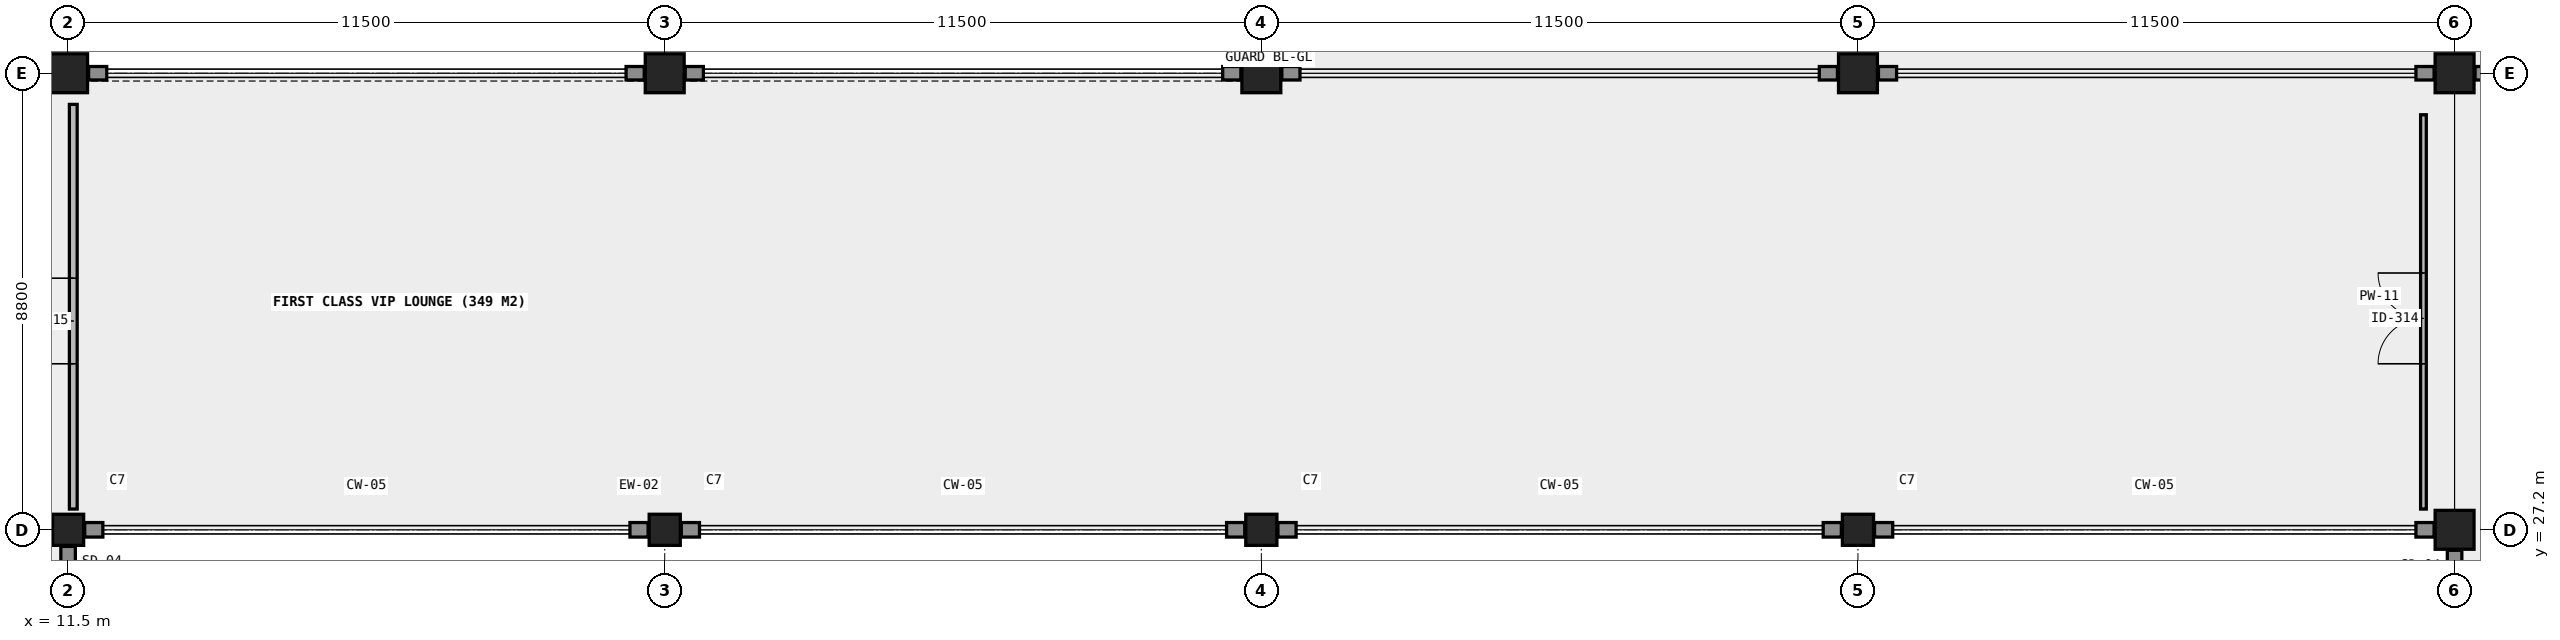
"""IFC4 building model, lengths in metres.
Left out: names, types, materials, properties, quantities, classifications, styles, units other than length and angle.
Written with IfcOpenShell. Run it as: python <this file> out.ifc"""

import sys

from ifc_helpers import new_model, si_unit, direction, frame, frame_2d, origin, origin_2d, place, context, subcontext, project, spatial, rectangle, circle, extrude, element, fill, save


model = new_model("IFC4")
c1 = context("Model", 3, precision=1e-05, world=origin(), true_north=direction((0.0, 1.0)))
c2 = subcontext(c1, "Body", "Model", "MODEL_VIEW")
j1 = project(units=[si_unit("LENGTHUNIT", "METRE"), si_unit("PLANEANGLEUNIT", "RADIAN")], contexts=[c1])
p1 = place(None, origin())
s1 = spatial("IfcSite", under=j1, at=p1, CompositionType="ELEMENT")
p2 = place(p1, origin())
s2 = spatial("IfcBuilding", under=s1, at=p2, CompositionType="ELEMENT")
p3 = place(p2, frame((0.0, 0.0, 8.4)))
s3 = spatial("IfcBuildingStorey", under=s2, at=p3, CompositionType="ELEMENT", Elevation=8.4)
p4 = place(p3, frame((11.5, 27.2, 0.0), z_axis=(0.0, 0.0, 1.0), x_axis=(1.0, 0.0, 0.0)))
e1 = element("IfcColumn", 1, at=p4, inside=s3, PredefinedType="COLUMN", context=c2, shape_type="SweptSolid", body=[
    extrude(rectangle(XDim=0.6, YDim=0.6, at=origin_2d()), origin(), (0.0, 0.0, 1.0), 5.4),
])
p5 = place(p3, frame((11.5, 36.0, 0.0), z_axis=(0.0, 0.0, 1.0), x_axis=(1.0, 0.0, 0.0)))
e2 = element("IfcColumn", 2, at=p5, inside=s3, PredefinedType="COLUMN", context=c2, shape_type="SweptSolid", body=[
    extrude(rectangle(XDim=0.75, YDim=0.75, at=origin_2d()), origin(), (0.0, 0.0, 1.0), 5.4),
])
p6 = place(p3, frame((23.0, 27.2, 0.0), z_axis=(0.0, 0.0, 1.0), x_axis=(1.0, 0.0, 0.0)))
e3 = element("IfcColumn", 3, at=p6, inside=s3, PredefinedType="COLUMN", context=c2, shape_type="SweptSolid", body=[
    extrude(rectangle(XDim=0.6, YDim=0.6, at=origin_2d()), origin(), (0.0, 0.0, 1.0), 5.4),
])
p7 = place(p3, frame((23.0, 36.0, 0.0), z_axis=(0.0, 0.0, 1.0), x_axis=(1.0, 0.0, 0.0)))
e4 = element("IfcColumn", 4, at=p7, inside=s3, PredefinedType="COLUMN", context=c2, shape_type="SweptSolid", body=[
    extrude(rectangle(XDim=0.75, YDim=0.75, at=origin_2d()), origin(), (0.0, 0.0, 1.0), 5.4),
])
p8 = place(p3, frame((34.5, 27.2, 0.0), z_axis=(0.0, 0.0, 1.0), x_axis=(1.0, 0.0, 0.0)))
e5 = element("IfcColumn", 5, at=p8, inside=s3, PredefinedType="COLUMN", context=c2, shape_type="SweptSolid", body=[
    extrude(rectangle(XDim=0.6, YDim=0.6, at=origin_2d()), origin(), (0.0, 0.0, 1.0), 5.4),
])
p9 = place(p3, frame((34.5, 36.0, 0.0), z_axis=(0.0, 0.0, 1.0), x_axis=(1.0, 0.0, 0.0)))
e6 = element("IfcColumn", 6, at=p9, inside=s3, PredefinedType="COLUMN", context=c2, shape_type="SweptSolid", body=[
    extrude(rectangle(XDim=0.75, YDim=0.75, at=origin_2d()), origin(), (0.0, 0.0, 1.0), 5.4),
])
p10 = place(p3, frame((46.0, 27.2, 0.0), z_axis=(0.0, 0.0, 1.0), x_axis=(1.0, 0.0, 0.0)))
e7 = element("IfcColumn", 7, at=p10, inside=s3, PredefinedType="COLUMN", context=c2, shape_type="SweptSolid", body=[
    extrude(rectangle(XDim=0.6, YDim=0.6, at=origin_2d()), origin(), (0.0, 0.0, 1.0), 5.4),
])
p11 = place(p3, frame((46.0, 36.0, 0.0), z_axis=(0.0, 0.0, 1.0), x_axis=(1.0, 0.0, 0.0)))
e8 = element("IfcColumn", 8, at=p11, inside=s3, PredefinedType="COLUMN", context=c2, shape_type="SweptSolid", body=[
    extrude(rectangle(XDim=0.75, YDim=0.75, at=origin_2d()), origin(), (0.0, 0.0, 1.0), 5.4),
])
p12 = place(p3, frame((57.5, 27.2, 0.0), z_axis=(0.0, 0.0, 1.0), x_axis=(1.0, 0.0, 0.0)))
e9 = element("IfcColumn", 9, at=p12, inside=s3, PredefinedType="COLUMN", context=c2, shape_type="SweptSolid", body=[
    extrude(circle(Radius=0.375, at=origin_2d()), origin(), (0.0, 0.0, 1.0), 5.4),
])
p13 = place(p3, frame((57.5, 36.0, 0.0), z_axis=(0.0, 0.0, 1.0), x_axis=(1.0, 0.0, 0.0)))
e10 = element("IfcColumn", 10, at=p13, inside=s3, PredefinedType="COLUMN", context=c2, shape_type="SweptSolid", body=[
    extrude(rectangle(XDim=0.75, YDim=0.75, at=origin_2d()), origin(), (0.0, 0.0, 1.0), 5.4),
])
p14 = place(p3, frame((11.5, 17.92, 0.0), z_axis=(0.0, 0.0, 1.0), x_axis=(0.0, 1.0, 0.0)))
e11 = element("IfcWall", 11, at=p14, inside=s3, PredefinedType="SOLIDWALL", context=c2, shape_type="SweptSolid", body=[
    extrude(rectangle(XDim=8.96, YDim=0.28, at=frame_2d((4.48, 0.0))), origin(), (0.0, 0.0, 1.0), 4.25),
])
p15 = place(p14, frame((1.32, 0.0, 0.85)))
e12 = element("IfcOpeningElement", 12, at=p15, cuts=e11, PredefinedType="OPENING", context=c2, shape_type="SweptSolid", body=[
    extrude(rectangle(XDim=2.5, YDim=2.2, at=frame_2d((1.25, 1.1))), frame((0.0, 0.15, 0.0), z_axis=(0.0, -1.0, 0.0), x_axis=(1.0, 0.0, 0.0)), (0.0, 0.0, 1.0), 0.3),
])
p16 = place(p14, frame((5.14, 0.0, 0.85)))
e13 = element("IfcOpeningElement", 13, at=p16, cuts=e11, PredefinedType="OPENING", context=c2, shape_type="SweptSolid", body=[
    extrude(rectangle(XDim=2.5, YDim=2.2, at=frame_2d((1.25, 1.1))), frame((0.0, 0.15, 0.0), z_axis=(0.0, -1.0, 0.0), x_axis=(1.0, 0.0, 0.0)), (0.0, 0.0, 1.0), 0.3),
])
for number, where, z_axis, x_axis in (
    (14, (11.82, 27.2, 0.0), (0.0, 0.0, 1.0), (1.0, 0.0, 0.0)),
    (15, (22.33, 27.2, 0.0), (0.0, 0.0, 1.0), (1.0, 0.0, 0.0)),
    (16, (23.32, 27.2, 0.0), (0.0, 0.0, 1.0), (1.0, 0.0, 0.0)),
    (17, (33.83, 27.2, 0.0), (0.0, 0.0, 1.0), (1.0, 0.0, 0.0)),
    (18, (34.82, 27.2, 0.0), (0.0, 0.0, 1.0), (1.0, 0.0, 0.0)),
    (19, (45.33, 27.2, 0.0), (0.0, 0.0, 1.0), (1.0, 0.0, 0.0)),
    (20, (46.32, 27.2, 0.0), (0.0, 0.0, 1.0), (1.0, 0.0, 0.0)),
):
    element("IfcWall", number, at=place(p3, frame(where, z_axis=z_axis, x_axis=x_axis)), inside=s3, PredefinedType="SOLIDWALL", context=c2, shape_type="SweptSolid", body=[
        extrude(rectangle(XDim=0.35, YDim=0.28, at=frame_2d((0.175, 0.0))), origin(), (0.0, 0.0, 1.0), 5.14),
    ])
p17 = place(p3, frame((56.755, 27.2, 0.0), z_axis=(0.0, 0.0, 1.0), x_axis=(1.0, 0.0, 0.0)))
e21 = element("IfcWall", 21, at=p17, inside=s3, PredefinedType="SOLIDWALL", context=c2, shape_type="SweptSolid", body=[
    extrude(rectangle(XDim=0.35, YDim=0.28, at=frame_2d((0.175, 0.0))), origin(), (0.0, 0.0, 1.0), 5.14),
])
p18 = place(p3, frame((57.5, 17.995, 0.0), z_axis=(0.0, 0.0, 1.0), x_axis=(0.0, 1.0, 0.0)))
e22 = element("IfcWall", 22, at=p18, inside=s3, PredefinedType="SOLIDWALL", context=c2, shape_type="SweptSolid", body=[
    extrude(rectangle(XDim=8.81, YDim=0.28, at=frame_2d((4.405, 0.0))), origin(), (0.0, 0.0, 1.0), 4.25),
])
p19 = place(p18, frame((2.237, 0.0, 0.85)))
e23 = element("IfcOpeningElement", 23, at=p19, cuts=e22, PredefinedType="OPENING", context=c2, shape_type="SweptSolid", body=[
    extrude(rectangle(XDim=1.05, YDim=2.05, at=frame_2d((0.525, 1.025))), frame((0.0, 0.15, 0.0), z_axis=(0.0, -1.0, 0.0), x_axis=(1.0, 0.0, 0.0)), (0.0, 0.0, 1.0), 0.3),
])
p20 = place(p18, frame((5.523, 0.0, 0.85)))
e24 = element("IfcOpeningElement", 24, at=p20, cuts=e22, PredefinedType="OPENING", context=c2, shape_type="SweptSolid", body=[
    extrude(rectangle(XDim=1.05, YDim=2.05, at=frame_2d((0.525, 1.025))), frame((0.0, 0.15, 0.0), z_axis=(0.0, -1.0, 0.0), x_axis=(1.0, 0.0, 0.0)), (0.0, 0.0, 1.0), 0.3),
])
for number, where, z_axis, x_axis in (
    (25, (11.895, 36.0, 0.0), (0.0, 0.0, 1.0), (1.0, 0.0, 0.0)),
    (26, (22.255, 36.0, 0.0), (0.0, 0.0, 1.0), (1.0, 0.0, 0.0)),
    (27, (23.395, 36.0, 0.0), (0.0, 0.0, 1.0), (1.0, 0.0, 0.0)),
    (28, (33.755, 36.0, 0.0), (0.0, 0.0, 1.0), (1.0, 0.0, 0.0)),
    (29, (34.895, 36.0, 0.0), (0.0, 0.0, 1.0), (1.0, 0.0, 0.0)),
    (30, (45.255, 36.0, 0.0), (0.0, 0.0, 1.0), (1.0, 0.0, 0.0)),
    (31, (46.395, 36.0, 0.0), (0.0, 0.0, 1.0), (1.0, 0.0, 0.0)),
    (32, (56.755, 36.0, 0.0), (0.0, 0.0, 1.0), (1.0, 0.0, 0.0)),
    (33, (57.895, 36.0, 0.0), (0.0, 0.0, 1.0), (1.0, 0.0, 0.0)),
):
    element("IfcWall", number, at=place(p3, frame(where, z_axis=z_axis, x_axis=x_axis)), inside=s3, PredefinedType="SOLIDWALL", context=c2, shape_type="SweptSolid", body=[
        extrude(rectangle(XDim=0.35, YDim=0.26, at=frame_2d((0.175, 0.0))), origin(), (0.0, 0.0, 1.0), 5.1),
    ])
p21 = place(p3, frame((56.9, 27.6, 0.0), z_axis=(0.0, 0.0, 1.0), x_axis=(0.0, 1.0, 0.0)))
e34 = element("IfcWall", 34, at=p21, inside=s3, PredefinedType="MOVABLE", context=c2, shape_type="SweptSolid", body=[
    extrude(rectangle(XDim=7.6, YDim=0.11, at=frame_2d((3.8, 0.0))), origin(), (0.0, 0.0, 1.0), 5.12),
])
p22 = place(p21, frame((2.8, 0.0, 0.0)))
e35 = element("IfcOpeningElement", 35, at=p22, cuts=e34, PredefinedType="OPENING", context=c2, shape_type="SweptSolid", body=[
    extrude(rectangle(XDim=1.75, YDim=2.3, at=frame_2d((0.875, 1.15))), frame((0.0, 0.065, 0.0), z_axis=(0.0, -1.0, 0.0), x_axis=(1.0, 0.0, 0.0)), (0.0, 0.0, 1.0), 0.13),
])
p23 = place(p3, frame((11.6, 27.6, 0.0), z_axis=(0.0, 0.0, 1.0), x_axis=(0.0, 1.0, 0.0)))
e36 = element("IfcWall", 36, at=p23, inside=s3, PredefinedType="PARTITIONING", context=c2, shape_type="SweptSolid", body=[
    extrude(rectangle(XDim=7.8, YDim=0.15, at=frame_2d((3.9, 0.0))), origin(), (0.0, 0.0, 1.0), 4.25),
])
p24 = place(p23, frame((2.8, 0.0, 0.0)))
e37 = element("IfcOpeningElement", 37, at=p24, cuts=e36, PredefinedType="OPENING", context=c2, shape_type="SweptSolid", body=[
    extrude(rectangle(XDim=1.65, YDim=2.2, at=frame_2d((0.825, 1.1))), frame((0.0, 0.085, 0.0), z_axis=(0.0, -1.0, 0.0), x_axis=(1.0, 0.0, 0.0)), (0.0, 0.0, 1.0), 0.17),
])
p25 = place(p22, origin())
e38 = element("IfcDoor", 38, at=p25, inside=s3, OperationType="DOUBLE_DOOR_SINGLE_SWING", PredefinedType="DOOR", context=c2, shape_type="SweptSolid", body=[
    extrude(rectangle(XDim=1.75, YDim=2.3, at=frame_2d((0.875, 1.15))), frame((0.0, 0.025, 0.0), z_axis=(0.0, -1.0, 0.0), x_axis=(1.0, 0.0, 0.0)), (0.0, 0.0, 1.0), 0.05),
])
fill(e35, e38)
p26 = place(p24, origin())
e39 = element("IfcDoor", 39, at=p26, inside=s3, OperationType="DOUBLE_DOOR_SINGLE_SWING", PredefinedType="DOOR", context=c2, shape_type="SweptSolid", body=[
    extrude(rectangle(XDim=1.65, YDim=2.2, at=frame_2d((0.825, 1.1))), frame((0.0, 0.025, 0.0), z_axis=(0.0, -1.0, 0.0), x_axis=(1.0, 0.0, 0.0)), (0.0, 0.0, 1.0), 0.05),
])
fill(e37, e39)
save(model, sys.argv[1])
